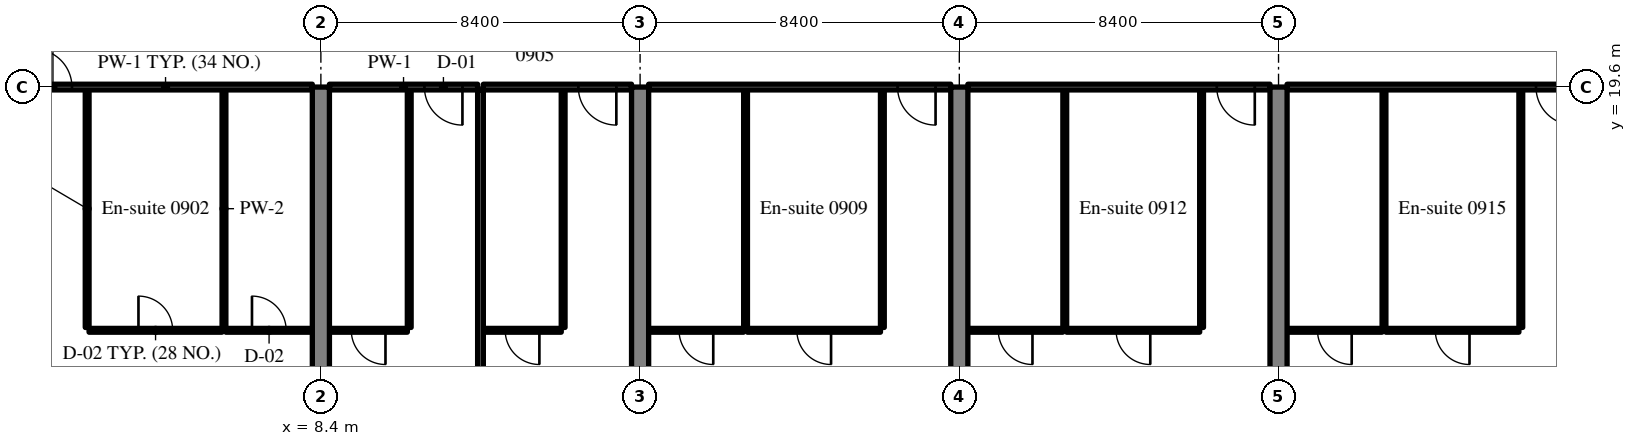
"""IFC4 building model, lengths in metres.
Left out: names, types, materials, properties, quantities, classifications, styles, units other than length and angle.
Written with IfcOpenShell. Run it as: python <this file> out.ifc"""

import sys

from ifc_helpers import new_model, si_unit, direction, frame, frame_2d, origin, place, context, subcontext, project, spatial, rectangle, extrude, source, transform, mapped, element, fill, save


model = new_model("IFC4")
c1 = context("Model", 3, precision=1e-05, world=origin(), true_north=direction((0.0, 1.0)))
c2 = subcontext(c1, "Body", "Model", "MODEL_VIEW")
j1 = project(units=[si_unit("LENGTHUNIT", "METRE"), si_unit("PLANEANGLEUNIT", "RADIAN")], contexts=[c1])
p1 = place(None, origin())
s1 = spatial("IfcSite", under=j1, at=p1, CompositionType="ELEMENT")
p2 = place(p1, origin())
s2 = spatial("IfcBuilding", under=s1, at=p2, CompositionType="ELEMENT")
p3 = place(p2, frame((0.0, 0.0, 43.0)))
s3 = spatial("IfcBuildingStorey", under=s2, at=p3, CompositionType="ELEMENT", Elevation=43.0)
m1 = source(origin(), c2, "Body", "SweptSolid", [
    extrude(rectangle(XDim=19.6, YDim=0.45, at=frame_2d((9.8, 0.0))), origin(), (0.0, 0.0, 1.0), 3.52),
])
for number, where, z_axis, x_axis in (
    (1, (8.4, 0.0, 0.0), (0.0, 0.0, 1.0), (0.0, 1.0, 0.0)),
    (2, (16.8, 0.0, 0.0), (0.0, 0.0, 1.0), (0.0, 1.0, 0.0)),
    (3, (25.2, 0.0, 0.0), (0.0, 0.0, 1.0), (0.0, 1.0, 0.0)),
    (4, (33.6, 0.0, 0.0), (0.0, 0.0, 1.0), (0.0, 1.0, 0.0)),
):
    element("IfcWall", number, at=place(p3, frame(where, z_axis=z_axis, x_axis=x_axis)), inside=s3, PredefinedType="SHEAR", context=c2, shape_type="MappedRepresentation", body=[
        mapped(m1, transform((0.0, 0.0, 0.0), scale=1.0)),
    ])
m2 = source(origin(), c2, "Body", "SweptSolid", [
    extrude(rectangle(XDim=6.25, YDim=0.1, at=frame_2d((3.125, 0.0))), origin(), (0.0, 0.0, 1.0), 3.52),
])
for number, where, z_axis, x_axis in (
    (5, (2.25, 13.275, 0.0), (0.0, 0.0, 1.0), (0.0, 1.0, 0.0)),
    (6, (5.85, 13.275, 0.0), (0.0, 0.0, 1.0), (0.0, 1.0, 0.0)),
):
    element("IfcWall", number, at=place(p3, frame(where, z_axis=z_axis, x_axis=x_axis)), inside=s3, PredefinedType="PARTITIONING", context=c2, shape_type="MappedRepresentation", body=[
        mapped(m2, transform((0.0, 0.0, 0.0), scale=1.0)),
    ])
m3 = source(origin(), c2, "Body", "SweptSolid", [
    extrude(rectangle(XDim=3.5, YDim=0.1, at=frame_2d((1.75, 0.0))), origin(), (0.0, 0.0, 1.0), 3.52),
])
p4 = place(p3, frame((2.3, 13.2, 0.0), z_axis=(0.0, 0.0, 1.0), x_axis=(1.0, 0.0, 0.0)))
e7 = element("IfcWall", 7, at=p4, inside=s3, PredefinedType="PARTITIONING", context=c2, shape_type="MappedRepresentation", body=[
    mapped(m3, transform((0.0, 0.0, 0.0), scale=1.0)),
])
m4 = source(origin(), c2, "Body", "SweptSolid", [
    extrude(rectangle(XDim=0.9, YDim=2.1, at=frame_2d((0.45, 1.05))), frame((0.0, 0.06, 0.0), z_axis=(0.0, -1.0, 0.0), x_axis=(1.0, 0.0, 0.0)), (0.0, 0.0, 1.0), 0.12),
])
p5 = place(p4, frame((1.3, 0.0, 0.0)))
e8 = element("IfcOpeningElement", 8, at=p5, cuts=e7, PredefinedType="OPENING", context=c2, shape_type="MappedRepresentation", body=[
    mapped(m4, transform((0.0, 0.0, 0.0), scale=1.0)),
])
m5 = source(origin(), c2, "Body", "SweptSolid", [
    extrude(rectangle(XDim=2.275, YDim=0.1, at=frame_2d((1.138, 0.0))), origin(), (0.0, 0.0, 1.0), 3.52),
])
p6 = place(p3, frame((5.9, 13.2, 0.0), z_axis=(0.0, 0.0, 1.0), x_axis=(1.0, 0.0, 0.0)))
e9 = element("IfcWall", 9, at=p6, inside=s3, PredefinedType="PARTITIONING", context=c2, shape_type="MappedRepresentation", body=[
    mapped(m5, transform((0.0, 0.0, 0.0), scale=1.0)),
])
p7 = place(p6, frame((0.687, 0.0, 0.0)))
e10 = element("IfcOpeningElement", 10, at=p7, cuts=e9, PredefinedType="OPENING", context=c2, shape_type="MappedRepresentation", body=[
    mapped(m4, transform((0.0, 0.0, 0.0), scale=1.0)),
])
m6 = source(origin(), c2, "Body", "SweptSolid", [
    extrude(rectangle(XDim=7.725, YDim=0.15, at=frame_2d((3.863, 0.0))), origin(), (0.0, 0.0, 1.0), 2.82),
])
p8 = place(p3, frame((0.45, 19.6, 0.0), z_axis=(0.0, 0.0, 1.0), x_axis=(1.0, 0.0, 0.0)))
e11 = element("IfcWall", 11, at=p8, inside=s3, PredefinedType="PARTITIONING", context=c2, shape_type="MappedRepresentation", body=[
    mapped(m6, transform((0.0, 0.0, 0.0), scale=1.0)),
])
m7 = source(origin(), c2, "Body", "SweptSolid", [
    extrude(rectangle(XDim=1.0, YDim=2.1, at=frame_2d((0.5, 1.05))), frame((0.0, 0.085, 0.0), z_axis=(0.0, -1.0, 0.0), x_axis=(1.0, 0.0, 0.0)), (0.0, 0.0, 1.0), 0.17),
])
p9 = place(p8, frame((0.4, 0.0, 0.0)))
e12 = element("IfcOpeningElement", 12, at=p9, cuts=e11, PredefinedType="OPENING", context=c2, shape_type="MappedRepresentation", body=[
    mapped(m7, transform((0.0, 0.0, 0.0), scale=1.0)),
])
p10 = place(p3, frame((10.725, 13.275, 0.0), z_axis=(0.0, 0.0, 1.0), x_axis=(0.0, 1.0, 0.0)))
e13 = element("IfcWall", 13, at=p10, inside=s3, PredefinedType="PARTITIONING", context=c2, shape_type="MappedRepresentation", body=[
    mapped(m2, transform((0.0, 0.0, 0.0), scale=1.0)),
])
m8 = source(origin(), c2, "Body", "SweptSolid", [
    extrude(rectangle(XDim=2.05, YDim=0.1, at=frame_2d((1.025, 0.0))), origin(), (0.0, 0.0, 1.0), 3.52),
])
p11 = place(p3, frame((8.625, 13.2, 0.0), z_axis=(0.0, 0.0, 1.0), x_axis=(1.0, 0.0, 0.0)))
e14 = element("IfcWall", 14, at=p11, inside=s3, PredefinedType="PARTITIONING", context=c2, shape_type="MappedRepresentation", body=[
    mapped(m8, transform((0.0, 0.0, 0.0), scale=1.0)),
])
p12 = place(p11, frame((0.575, 0.0, 0.0)))
e15 = element("IfcOpeningElement", 15, at=p12, cuts=e14, PredefinedType="OPENING", context=c2, shape_type="MappedRepresentation", body=[
    mapped(m4, transform((0.0, 0.0, 0.0), scale=1.0)),
])
m9 = source(origin(), c2, "Body", "SweptSolid", [
    extrude(rectangle(XDim=3.9, YDim=0.15, at=frame_2d((1.95, 0.0))), origin(), (0.0, 0.0, 1.0), 2.82),
])
p13 = place(p3, frame((8.625, 19.6, 0.0), z_axis=(0.0, 0.0, 1.0), x_axis=(1.0, 0.0, 0.0)))
e16 = element("IfcWall", 16, at=p13, inside=s3, PredefinedType="PARTITIONING", context=c2, shape_type="MappedRepresentation", body=[
    mapped(m9, transform((0.0, 0.0, 0.0), scale=1.0)),
])
p14 = place(p13, frame((2.5, 0.0, 0.0)))
e17 = element("IfcOpeningElement", 17, at=p14, cuts=e16, PredefinedType="OPENING", context=c2, shape_type="MappedRepresentation", body=[
    mapped(m7, transform((0.0, 0.0, 0.0), scale=1.0)),
])
p15 = place(p3, frame((14.775, 13.275, 0.0), z_axis=(0.0, 0.0, 1.0), x_axis=(0.0, 1.0, 0.0)))
e18 = element("IfcWall", 18, at=p15, inside=s3, PredefinedType="PARTITIONING", context=c2, shape_type="MappedRepresentation", body=[
    mapped(m2, transform((0.0, 0.0, 0.0), scale=1.0)),
])
p16 = place(p3, frame((12.675, 13.2, 0.0), z_axis=(0.0, 0.0, 1.0), x_axis=(1.0, 0.0, 0.0)))
e19 = element("IfcWall", 19, at=p16, inside=s3, PredefinedType="PARTITIONING", context=c2, shape_type="MappedRepresentation", body=[
    mapped(m8, transform((0.0, 0.0, 0.0), scale=1.0)),
])
p17 = place(p16, frame((0.575, 0.0, 0.0)))
e20 = element("IfcOpeningElement", 20, at=p17, cuts=e19, PredefinedType="OPENING", context=c2, shape_type="MappedRepresentation", body=[
    mapped(m4, transform((0.0, 0.0, 0.0), scale=1.0)),
])
p18 = place(p3, frame((12.675, 19.6, 0.0), z_axis=(0.0, 0.0, 1.0), x_axis=(1.0, 0.0, 0.0)))
e21 = element("IfcWall", 21, at=p18, inside=s3, PredefinedType="PARTITIONING", context=c2, shape_type="MappedRepresentation", body=[
    mapped(m9, transform((0.0, 0.0, 0.0), scale=1.0)),
])
p19 = place(p18, frame((2.5, 0.0, 0.0)))
e22 = element("IfcOpeningElement", 22, at=p19, cuts=e21, PredefinedType="OPENING", context=c2, shape_type="MappedRepresentation", body=[
    mapped(m7, transform((0.0, 0.0, 0.0), scale=1.0)),
])
m10 = source(origin(), c2, "Body", "SweptSolid", [
    extrude(rectangle(XDim=18.625, YDim=0.15, at=frame_2d((9.312, 0.0))), origin(), (0.0, 0.0, 1.0), 3.52),
])
p20 = place(p3, frame((12.6, 0.9, 0.0), z_axis=(0.0, 0.0, 1.0), x_axis=(0.0, 1.0, 0.0)))
e23 = element("IfcWall", 23, at=p20, inside=s3, PredefinedType="PARTITIONING", context=c2, shape_type="MappedRepresentation", body=[
    mapped(m10, transform((0.0, 0.0, 0.0), scale=1.0)),
])
for number, where, z_axis, x_axis in (
    (24, (23.175, 13.275, 0.0), (0.0, 0.0, 1.0), (0.0, 1.0, 0.0)),
    (25, (19.575, 13.275, 0.0), (0.0, 0.0, 1.0), (0.0, 1.0, 0.0)),
):
    element("IfcWall", number, at=place(p3, frame(where, z_axis=z_axis, x_axis=x_axis)), inside=s3, PredefinedType="PARTITIONING", context=c2, shape_type="MappedRepresentation", body=[
        mapped(m2, transform((0.0, 0.0, 0.0), scale=1.0)),
    ])
p21 = place(p3, frame((19.625, 13.2, 0.0), z_axis=(0.0, 0.0, 1.0), x_axis=(1.0, 0.0, 0.0)))
e26 = element("IfcWall", 26, at=p21, inside=s3, PredefinedType="PARTITIONING", context=c2, shape_type="MappedRepresentation", body=[
    mapped(m3, transform((0.0, 0.0, 0.0), scale=1.0)),
])
p22 = place(p21, frame((1.3, 0.0, 0.0)))
e27 = element("IfcOpeningElement", 27, at=p22, cuts=e26, PredefinedType="OPENING", context=c2, shape_type="MappedRepresentation", body=[
    mapped(m4, transform((0.0, 0.0, 0.0), scale=1.0)),
])
m11 = source(origin(), c2, "Body", "SweptSolid", [
    extrude(rectangle(XDim=2.5, YDim=0.1, at=frame_2d((1.25, 0.0))), origin(), (0.0, 0.0, 1.0), 3.52),
])
p23 = place(p3, frame((17.025, 13.2, 0.0), z_axis=(0.0, 0.0, 1.0), x_axis=(1.0, 0.0, 0.0)))
e28 = element("IfcWall", 28, at=p23, inside=s3, PredefinedType="PARTITIONING", context=c2, shape_type="MappedRepresentation", body=[
    mapped(m11, transform((0.0, 0.0, 0.0), scale=1.0)),
])
p24 = place(p23, frame((0.8, 0.0, 0.0)))
e29 = element("IfcOpeningElement", 29, at=p24, cuts=e28, PredefinedType="OPENING", context=c2, shape_type="MappedRepresentation", body=[
    mapped(m4, transform((0.0, 0.0, 0.0), scale=1.0)),
])
m12 = source(origin(), c2, "Body", "SweptSolid", [
    extrude(rectangle(XDim=7.95, YDim=0.15, at=frame_2d((3.975, 0.0))), origin(), (0.0, 0.0, 1.0), 2.82),
])
p25 = place(p3, frame((17.025, 19.6, 0.0), z_axis=(0.0, 0.0, 1.0), x_axis=(1.0, 0.0, 0.0)))
e30 = element("IfcWall", 30, at=p25, inside=s3, PredefinedType="PARTITIONING", context=c2, shape_type="MappedRepresentation", body=[
    mapped(m12, transform((0.0, 0.0, 0.0), scale=1.0)),
])
p26 = place(p25, frame((6.55, 0.0, 0.0)))
e31 = element("IfcOpeningElement", 31, at=p26, cuts=e30, PredefinedType="OPENING", context=c2, shape_type="MappedRepresentation", body=[
    mapped(m7, transform((0.0, 0.0, 0.0), scale=1.0)),
])
for number, where, z_axis, x_axis in (
    (32, (31.575, 13.275, 0.0), (0.0, 0.0, 1.0), (0.0, 1.0, 0.0)),
    (33, (27.975, 13.275, 0.0), (0.0, 0.0, 1.0), (0.0, 1.0, 0.0)),
):
    element("IfcWall", number, at=place(p3, frame(where, z_axis=z_axis, x_axis=x_axis)), inside=s3, PredefinedType="PARTITIONING", context=c2, shape_type="MappedRepresentation", body=[
        mapped(m2, transform((0.0, 0.0, 0.0), scale=1.0)),
    ])
p27 = place(p3, frame((28.025, 13.2, 0.0), z_axis=(0.0, 0.0, 1.0), x_axis=(1.0, 0.0, 0.0)))
e34 = element("IfcWall", 34, at=p27, inside=s3, PredefinedType="PARTITIONING", context=c2, shape_type="MappedRepresentation", body=[
    mapped(m3, transform((0.0, 0.0, 0.0), scale=1.0)),
])
p28 = place(p27, frame((1.3, 0.0, 0.0)))
e35 = element("IfcOpeningElement", 35, at=p28, cuts=e34, PredefinedType="OPENING", context=c2, shape_type="MappedRepresentation", body=[
    mapped(m4, transform((0.0, 0.0, 0.0), scale=1.0)),
])
p29 = place(p3, frame((25.425, 13.2, 0.0), z_axis=(0.0, 0.0, 1.0), x_axis=(1.0, 0.0, 0.0)))
e36 = element("IfcWall", 36, at=p29, inside=s3, PredefinedType="PARTITIONING", context=c2, shape_type="MappedRepresentation", body=[
    mapped(m11, transform((0.0, 0.0, 0.0), scale=1.0)),
])
p30 = place(p29, frame((0.8, 0.0, 0.0)))
e37 = element("IfcOpeningElement", 37, at=p30, cuts=e36, PredefinedType="OPENING", context=c2, shape_type="MappedRepresentation", body=[
    mapped(m4, transform((0.0, 0.0, 0.0), scale=1.0)),
])
m13 = source(origin(), c2, "Body", "SweptSolid", [
    extrude(rectangle(XDim=7.95, YDim=0.15, at=frame_2d((3.975, 0.0))), origin(), (0.0, 0.0, 1.0), 2.82),
])
p31 = place(p3, frame((25.425, 19.6, 0.0), z_axis=(0.0, 0.0, 1.0), x_axis=(1.0, 0.0, 0.0)))
e38 = element("IfcWall", 38, at=p31, inside=s3, PredefinedType="PARTITIONING", context=c2, shape_type="MappedRepresentation", body=[
    mapped(m13, transform((0.0, 0.0, 0.0), scale=1.0)),
])
p32 = place(p31, frame((6.55, 0.0, 0.0)))
e39 = element("IfcOpeningElement", 39, at=p32, cuts=e38, PredefinedType="OPENING", context=c2, shape_type="MappedRepresentation", body=[
    mapped(m7, transform((0.0, 0.0, 0.0), scale=1.0)),
])
for number, where, z_axis, x_axis in (
    (40, (39.975, 13.275, 0.0), (0.0, 0.0, 1.0), (0.0, 1.0, 0.0)),
    (41, (36.375, 13.275, 0.0), (0.0, 0.0, 1.0), (0.0, 1.0, 0.0)),
):
    element("IfcWall", number, at=place(p3, frame(where, z_axis=z_axis, x_axis=x_axis)), inside=s3, PredefinedType="PARTITIONING", context=c2, shape_type="MappedRepresentation", body=[
        mapped(m2, transform((0.0, 0.0, 0.0), scale=1.0)),
    ])
p33 = place(p3, frame((36.425, 13.2, 0.0), z_axis=(0.0, 0.0, 1.0), x_axis=(1.0, 0.0, 0.0)))
e42 = element("IfcWall", 42, at=p33, inside=s3, PredefinedType="PARTITIONING", context=c2, shape_type="MappedRepresentation", body=[
    mapped(m3, transform((0.0, 0.0, 0.0), scale=1.0)),
])
p34 = place(p33, frame((1.3, 0.0, 0.0)))
e43 = element("IfcOpeningElement", 43, at=p34, cuts=e42, PredefinedType="OPENING", context=c2, shape_type="MappedRepresentation", body=[
    mapped(m4, transform((0.0, 0.0, 0.0), scale=1.0)),
])
p35 = place(p3, frame((33.825, 13.2, 0.0), z_axis=(0.0, 0.0, 1.0), x_axis=(1.0, 0.0, 0.0)))
e44 = element("IfcWall", 44, at=p35, inside=s3, PredefinedType="PARTITIONING", context=c2, shape_type="MappedRepresentation", body=[
    mapped(m11, transform((0.0, 0.0, 0.0), scale=1.0)),
])
p36 = place(p35, frame((0.8, 0.0, 0.0)))
e45 = element("IfcOpeningElement", 45, at=p36, cuts=e44, PredefinedType="OPENING", context=c2, shape_type="MappedRepresentation", body=[
    mapped(m4, transform((0.0, 0.0, 0.0), scale=1.0)),
])
p37 = place(p3, frame((33.825, 19.6, 0.0), z_axis=(0.0, 0.0, 1.0), x_axis=(1.0, 0.0, 0.0)))
e46 = element("IfcWall", 46, at=p37, inside=s3, PredefinedType="PARTITIONING", context=c2, shape_type="MappedRepresentation", body=[
    mapped(m13, transform((0.0, 0.0, 0.0), scale=1.0)),
])
p38 = place(p37, frame((6.55, 0.0, 0.0)))
e47 = element("IfcOpeningElement", 47, at=p38, cuts=e46, PredefinedType="OPENING", context=c2, shape_type="MappedRepresentation", body=[
    mapped(m7, transform((0.0, 0.0, 0.0), scale=1.0)),
])
m14 = source(origin(), c2, "Body", "SweptSolid", [
    extrude(rectangle(XDim=0.9, YDim=2.1, at=frame_2d((0.45, 1.05))), frame((0.0, 0.025, 0.0), z_axis=(0.0, -1.0, 0.0), x_axis=(1.0, 0.0, 0.0)), (0.0, 0.0, 1.0), 0.05),
])
p39 = place(p5, origin())
e48 = element("IfcDoor", 48, at=p39, inside=s3, OperationType="SINGLE_SWING_LEFT", PredefinedType="DOOR", context=c2, shape_type="MappedRepresentation", body=[
    mapped(m14, transform((0.0, 0.0, 0.0), scale=1.0)),
])
fill(e8, e48)
p40 = place(p7, origin())
e49 = element("IfcDoor", 49, at=p40, inside=s3, OperationType="SINGLE_SWING_LEFT", PredefinedType="DOOR", context=c2, shape_type="MappedRepresentation", body=[
    mapped(m14, transform((0.0, 0.0, 0.0), scale=1.0)),
])
fill(e10, e49)
m15 = source(origin(), c2, "Body", "SweptSolid", [
    extrude(rectangle(XDim=1.0, YDim=2.1, at=frame_2d((0.5, 1.05))), frame((0.0, 0.025, 0.0), z_axis=(0.0, -1.0, 0.0), x_axis=(1.0, 0.0, 0.0)), (0.0, 0.0, 1.0), 0.05),
])
p41 = place(p9, origin())
e50 = element("IfcDoor", 50, at=p41, inside=s3, OperationType="SINGLE_SWING_LEFT", PredefinedType="DOOR", context=c2, shape_type="MappedRepresentation", body=[
    mapped(m15, transform((0.0, 0.0, 0.0), scale=1.0)),
])
fill(e12, e50)
p42 = place(p12, origin())
e51 = element("IfcDoor", 51, at=p42, inside=s3, OperationType="SINGLE_SWING_RIGHT", PredefinedType="DOOR", context=c2, shape_type="MappedRepresentation", body=[
    mapped(m14, transform((0.0, 0.0, 0.0), scale=1.0)),
])
fill(e15, e51)
p43 = place(p14, origin())
e52 = element("IfcDoor", 52, at=p43, inside=s3, OperationType="SINGLE_SWING_RIGHT", PredefinedType="DOOR", context=c2, shape_type="MappedRepresentation", body=[
    mapped(m15, transform((0.0, 0.0, 0.0), scale=1.0)),
])
fill(e17, e52)
p44 = place(p17, origin())
e53 = element("IfcDoor", 53, at=p44, inside=s3, OperationType="SINGLE_SWING_RIGHT", PredefinedType="DOOR", context=c2, shape_type="MappedRepresentation", body=[
    mapped(m14, transform((0.0, 0.0, 0.0), scale=1.0)),
])
fill(e20, e53)
p45 = place(p19, origin())
e54 = element("IfcDoor", 54, at=p45, inside=s3, OperationType="SINGLE_SWING_RIGHT", PredefinedType="DOOR", context=c2, shape_type="MappedRepresentation", body=[
    mapped(m15, transform((0.0, 0.0, 0.0), scale=1.0)),
])
fill(e22, e54)
p46 = place(p22, origin())
e55 = element("IfcDoor", 55, at=p46, inside=s3, OperationType="SINGLE_SWING_RIGHT", PredefinedType="DOOR", context=c2, shape_type="MappedRepresentation", body=[
    mapped(m14, transform((0.0, 0.0, 0.0), scale=1.0)),
])
fill(e27, e55)
p47 = place(p24, origin())
e56 = element("IfcDoor", 56, at=p47, inside=s3, OperationType="SINGLE_SWING_RIGHT", PredefinedType="DOOR", context=c2, shape_type="MappedRepresentation", body=[
    mapped(m14, transform((0.0, 0.0, 0.0), scale=1.0)),
])
fill(e29, e56)
p48 = place(p26, origin())
e57 = element("IfcDoor", 57, at=p48, inside=s3, OperationType="SINGLE_SWING_RIGHT", PredefinedType="DOOR", context=c2, shape_type="MappedRepresentation", body=[
    mapped(m15, transform((0.0, 0.0, 0.0), scale=1.0)),
])
fill(e31, e57)
p49 = place(p28, origin())
e58 = element("IfcDoor", 58, at=p49, inside=s3, OperationType="SINGLE_SWING_RIGHT", PredefinedType="DOOR", context=c2, shape_type="MappedRepresentation", body=[
    mapped(m14, transform((0.0, 0.0, 0.0), scale=1.0)),
])
fill(e35, e58)
p50 = place(p30, origin())
e59 = element("IfcDoor", 59, at=p50, inside=s3, OperationType="SINGLE_SWING_RIGHT", PredefinedType="DOOR", context=c2, shape_type="MappedRepresentation", body=[
    mapped(m14, transform((0.0, 0.0, 0.0), scale=1.0)),
])
fill(e37, e59)
p51 = place(p32, origin())
e60 = element("IfcDoor", 60, at=p51, inside=s3, OperationType="SINGLE_SWING_RIGHT", PredefinedType="DOOR", context=c2, shape_type="MappedRepresentation", body=[
    mapped(m15, transform((0.0, 0.0, 0.0), scale=1.0)),
])
fill(e39, e60)
p52 = place(p34, origin())
e61 = element("IfcDoor", 61, at=p52, inside=s3, OperationType="SINGLE_SWING_RIGHT", PredefinedType="DOOR", context=c2, shape_type="MappedRepresentation", body=[
    mapped(m14, transform((0.0, 0.0, 0.0), scale=1.0)),
])
fill(e43, e61)
p53 = place(p36, origin())
e62 = element("IfcDoor", 62, at=p53, inside=s3, OperationType="SINGLE_SWING_RIGHT", PredefinedType="DOOR", context=c2, shape_type="MappedRepresentation", body=[
    mapped(m14, transform((0.0, 0.0, 0.0), scale=1.0)),
])
fill(e45, e62)
p54 = place(p38, origin())
e63 = element("IfcDoor", 63, at=p54, inside=s3, OperationType="SINGLE_SWING_RIGHT", PredefinedType="DOOR", context=c2, shape_type="MappedRepresentation", body=[
    mapped(m15, transform((0.0, 0.0, 0.0), scale=1.0)),
])
fill(e47, e63)
save(model, sys.argv[1])
